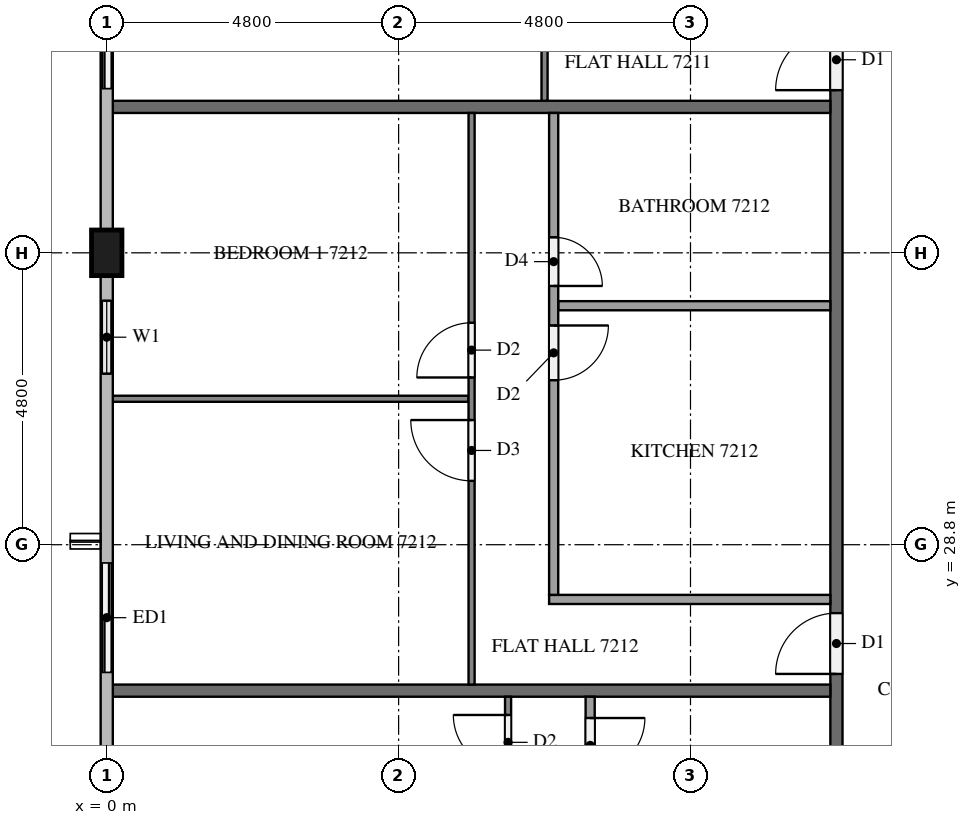
"""IFC4 building model, lengths in metres.
Left out: names, types, materials, properties, quantities, classifications, styles, units other than length and angle.
Written with IfcOpenShell. Run it as: python <this file> out.ifc"""

import sys

from ifc_helpers import new_model, si_unit, direction, frame, frame_2d, origin, origin_2d, place, context, subcontext, project, spatial, rectangle, extrude, element, fill, save


model = new_model("IFC4")
c1 = context("Model", 3, precision=1e-05, world=origin(), true_north=direction((0.0, 1.0)))
c2 = subcontext(c1, "Body", "Model", "MODEL_VIEW")
j1 = project(units=[si_unit("LENGTHUNIT", "METRE"), si_unit("PLANEANGLEUNIT", "RADIAN")], contexts=[c1])
p1 = place(None, origin())
s1 = spatial("IfcSite", under=j1, at=p1, CompositionType="ELEMENT")
p2 = place(p1, origin())
s2 = spatial("IfcBuilding", under=s1, at=p2, CompositionType="ELEMENT")
p3 = place(p2, frame((0.0, 0.0, 275.6)))
s3 = spatial("IfcBuildingStorey", under=s2, at=p3, CompositionType="ELEMENT", Elevation=275.6)
p4 = place(p3, frame((0.0, 33.6, 0.0), z_axis=(0.0, 0.0, 1.0), x_axis=(0.0, 1.0, 0.0)))
e1 = element("IfcColumn", 1, at=p4, inside=s3, PredefinedType="COLUMN", context=c2, shape_type="SweptSolid", body=[
    extrude(rectangle(XDim=0.75, YDim=0.5, at=origin_2d()), origin(), (0.0, 0.0, 1.0), 3.2),
])
p5 = place(p3, frame((0.0, 38.4, 0.0), z_axis=(0.0, 0.0, 1.0), x_axis=(0.0, -1.0, 0.0)))
e2 = element("IfcWall", 2, at=p5, inside=s3, PredefinedType="SOLIDWALL", context=c2, shape_type="SweptSolid", body=[
    extrude(rectangle(XDim=2.4, YDim=0.15, at=frame_2d((1.2, 0.0))), origin(), (0.0, 0.0, 1.0), 3.2),
])
p6 = place(p5, frame((0.3, 0.0, 0.0)))
e3 = element("IfcOpeningElement", 3, at=p6, cuts=e2, PredefinedType="OPENING", context=c2, shape_type="SweptSolid", body=[
    extrude(rectangle(XDim=1.8, YDim=2.4, at=frame_2d((0.9, 1.2))), frame((0.0, 0.085, 0.0), z_axis=(0.0, -1.0, 0.0), x_axis=(1.0, 0.0, 0.0)), (0.0, 0.0, 1.0), 0.17),
])
p7 = place(p3, frame((0.0, 33.225, 0.0), z_axis=(0.0, 0.0, 1.0), x_axis=(0.0, -1.0, 0.0)))
e4 = element("IfcWall", 4, at=p7, inside=s3, PredefinedType="SOLIDWALL", context=c2, shape_type="SweptSolid", body=[
    extrude(rectangle(XDim=2.025, YDim=0.15, at=frame_2d((1.013, 0.0))), origin(), (0.0, 0.0, 1.0), 3.2),
])
p8 = place(p7, frame((0.413, 0.0, 0.9)))
e5 = element("IfcOpeningElement", 5, at=p8, cuts=e4, PredefinedType="OPENING", context=c2, shape_type="SweptSolid", body=[
    extrude(rectangle(XDim=1.2, YDim=1.4, at=frame_2d((0.6, 0.7))), frame((0.0, 0.085, 0.0), z_axis=(0.0, -1.0, 0.0), x_axis=(1.0, 0.0, 0.0)), (0.0, 0.0, 1.0), 0.17),
])
p9 = place(p3, frame((0.0, 28.8, 0.0), z_axis=(0.0, 0.0, 1.0), x_axis=(0.0, -1.0, 0.0)))
e6 = element("IfcWall", 6, at=p9, inside=s3, PredefinedType="SOLIDWALL", context=c2, shape_type="SweptSolid", body=[
    extrude(rectangle(XDim=2.4, YDim=0.15, at=frame_2d((1.2, 0.0))), origin(), (0.0, 0.0, 1.0), 3.2),
])
p10 = place(p9, frame((0.3, 0.0, 0.0)))
e7 = element("IfcOpeningElement", 7, at=p10, cuts=e6, PredefinedType="OPENING", context=c2, shape_type="SweptSolid", body=[
    extrude(rectangle(XDim=1.8, YDim=2.4, at=frame_2d((0.9, 1.2))), frame((0.0, 0.085, 0.0), z_axis=(0.0, -1.0, 0.0), x_axis=(1.0, 0.0, 0.0)), (0.0, 0.0, 1.0), 0.17),
])
p11 = place(p3, frame((12.0, 12.1, 0.0), z_axis=(0.0, 0.0, 1.0), x_axis=(0.0, 1.0, 0.0)))
e8 = element("IfcWall", 8, at=p11, inside=s3, PredefinedType="PARTITIONING", context=c2, shape_type="SweptSolid", body=[
    extrude(rectangle(XDim=28.6, YDim=0.2, at=frame_2d((14.3, 0.0))), origin(), (0.0, 0.0, 1.0), 3.2),
])
p12 = place(p11, frame((24.175, 0.0, 0.0)))
e9 = element("IfcOpeningElement", 9, at=p12, cuts=e8, PredefinedType="OPENING", context=c2, shape_type="SweptSolid", body=[
    extrude(rectangle(XDim=1.0, YDim=2.1, at=frame_2d((0.5, 1.05))), frame((0.0, 0.11, 0.0), z_axis=(0.0, -1.0, 0.0), x_axis=(1.0, 0.0, 0.0)), (0.0, 0.0, 1.0), 0.22),
])
p13 = place(p11, frame((14.575, 0.0, 0.0)))
e10 = element("IfcOpeningElement", 10, at=p13, cuts=e8, PredefinedType="OPENING", context=c2, shape_type="SweptSolid", body=[
    extrude(rectangle(XDim=1.0, YDim=2.1, at=frame_2d((0.5, 1.05))), frame((0.0, 0.11, 0.0), z_axis=(0.0, -1.0, 0.0), x_axis=(1.0, 0.0, 0.0)), (0.0, 0.0, 1.0), 0.22),
])
p14 = place(p11, frame((0.175, 0.0, 0.0)))
e11 = element("IfcOpeningElement", 11, at=p14, cuts=e8, PredefinedType="OPENING", context=c2, shape_type="SweptSolid", body=[
    extrude(rectangle(XDim=1.0, YDim=2.1, at=frame_2d((0.5, 1.05))), frame((0.0, 0.11, 0.0), z_axis=(0.0, -1.0, 0.0), x_axis=(1.0, 0.0, 0.0)), (0.0, 0.0, 1.0), 0.22),
])
for number, where, z_axis, x_axis in (
    (12, (0.1, 36.0, 0.0), (0.0, 0.0, 1.0), (1.0, 0.0, 0.0)),
    (13, (0.1, 26.4, 0.0), (0.0, 0.0, 1.0), (1.0, 0.0, 0.0)),
):
    element("IfcWall", number, at=place(p3, frame(where, z_axis=z_axis, x_axis=x_axis)), inside=s3, PredefinedType="PARTITIONING", context=c2, shape_type="SweptSolid", body=[
        extrude(rectangle(XDim=11.8, YDim=0.2, at=frame_2d((5.9, 0.0))), origin(), (0.0, 0.0, 1.0), 3.2),
    ])
p15 = place(p3, frame((7.2, 36.1, 0.0), z_axis=(0.0, 0.0, 1.0), x_axis=(0.0, 1.0, 0.0)))
e14 = element("IfcWall", 14, at=p15, inside=s3, PredefinedType="PARTITIONING", context=c2, shape_type="SweptSolid", body=[
    extrude(rectangle(XDim=11.8, YDim=0.1, at=frame_2d((5.9, 0.0))), origin(), (0.0, 0.0, 1.0), 3.2),
])
p16 = place(p15, frame((5.75, 0.0, 0.0)))
e15 = element("IfcOpeningElement", 15, at=p16, cuts=e14, PredefinedType="OPENING", context=c2, shape_type="SweptSolid", body=[
    extrude(rectangle(XDim=1.0, YDim=2.1, at=frame_2d((0.5, 1.05))), frame((0.0, 0.06, 0.0), z_axis=(0.0, -1.0, 0.0), x_axis=(1.0, 0.0, 0.0)), (0.0, 0.0, 1.0), 0.12),
])
p17 = place(p15, frame((7.45, 0.0, 0.0)))
e16 = element("IfcOpeningElement", 16, at=p17, cuts=e14, PredefinedType="OPENING", context=c2, shape_type="SweptSolid", body=[
    extrude(rectangle(XDim=0.9, YDim=2.1, at=frame_2d((0.45, 1.05))), frame((0.0, 0.06, 0.0), z_axis=(0.0, -1.0, 0.0), x_axis=(1.0, 0.0, 0.0)), (0.0, 0.0, 1.0), 0.12),
])
p18 = place(p3, frame((5.95, 31.2, 0.0), z_axis=(0.0, 0.0, 1.0), x_axis=(-1.0, 0.0, 0.0)))
e17 = element("IfcWall", 17, at=p18, inside=s3, PredefinedType="PARTITIONING", context=c2, shape_type="SweptSolid", body=[
    extrude(rectangle(XDim=5.85, YDim=0.1, at=frame_2d((2.925, 0.0))), origin(), (0.0, 0.0, 1.0), 3.2),
])
p19 = place(p3, frame((6.0, 26.5, 0.0), z_axis=(0.0, 0.0, 1.0), x_axis=(0.0, 1.0, 0.0)))
e18 = element("IfcWall", 18, at=p19, inside=s3, PredefinedType="PARTITIONING", context=c2, shape_type="SweptSolid", body=[
    extrude(rectangle(XDim=9.4, YDim=0.1, at=frame_2d((4.7, 0.0))), origin(), (0.0, 0.0, 1.0), 3.2),
])
p20 = place(p19, frame((3.35, 0.0, 0.0)))
e19 = element("IfcOpeningElement", 19, at=p20, cuts=e18, PredefinedType="OPENING", context=c2, shape_type="SweptSolid", body=[
    extrude(rectangle(XDim=1.0, YDim=2.1, at=frame_2d((0.5, 1.05))), frame((0.0, 0.06, 0.0), z_axis=(0.0, -1.0, 0.0), x_axis=(1.0, 0.0, 0.0)), (0.0, 0.0, 1.0), 0.12),
])
p21 = place(p19, frame((5.05, 0.0, 0.0)))
e20 = element("IfcOpeningElement", 20, at=p21, cuts=e18, PredefinedType="OPENING", context=c2, shape_type="SweptSolid", body=[
    extrude(rectangle(XDim=0.9, YDim=2.1, at=frame_2d((0.45, 1.05))), frame((0.0, 0.06, 0.0), z_axis=(0.0, -1.0, 0.0), x_axis=(1.0, 0.0, 0.0)), (0.0, 0.0, 1.0), 0.12),
])
p22 = place(p3, frame((11.9, 32.73, 0.0), z_axis=(0.0, 0.0, 1.0), x_axis=(-1.0, 0.0, 0.0)))
e21 = element("IfcWall", 21, at=p22, inside=s3, PredefinedType="PARTITIONING", context=c2, shape_type="SweptSolid", body=[
    extrude(rectangle(XDim=4.475, YDim=0.15, at=frame_2d((2.237, 0.0))), origin(), (0.0, 0.0, 1.0), 3.2),
])
p23 = place(p3, frame((11.9, 27.9, 0.0), z_axis=(0.0, 0.0, 1.0), x_axis=(-1.0, 0.0, 0.0)))
e22 = element("IfcWall", 22, at=p23, inside=s3, PredefinedType="PARTITIONING", context=c2, shape_type="SweptSolid", body=[
    extrude(rectangle(XDim=4.625, YDim=0.15, at=frame_2d((2.312, 0.0))), origin(), (0.0, 0.0, 1.0), 3.2),
])
p24 = place(p3, frame((7.35, 35.9, 0.0), z_axis=(0.0, 0.0, 1.0), x_axis=(0.0, -1.0, 0.0)))
e23 = element("IfcWall", 23, at=p24, inside=s3, PredefinedType="PARTITIONING", context=c2, shape_type="SweptSolid", body=[
    extrude(rectangle(XDim=7.925, YDim=0.15, at=frame_2d((3.962, 0.0))), origin(), (0.0, 0.0, 1.0), 3.2),
])
p25 = place(p24, frame((3.495, 0.0, 0.0)))
e24 = element("IfcOpeningElement", 24, at=p25, cuts=e23, PredefinedType="OPENING", context=c2, shape_type="SweptSolid", body=[
    extrude(rectangle(XDim=0.9, YDim=2.1, at=frame_2d((0.45, 1.05))), frame((0.0, 0.085, 0.0), z_axis=(0.0, -1.0, 0.0), x_axis=(1.0, 0.0, 0.0)), (0.0, 0.0, 1.0), 0.17),
])
p26 = place(p24, frame((2.045, 0.0, 0.0)))
e25 = element("IfcOpeningElement", 25, at=p26, cuts=e23, PredefinedType="OPENING", context=c2, shape_type="SweptSolid", body=[
    extrude(rectangle(XDim=0.8, YDim=2.1, at=frame_2d((0.4, 1.05))), frame((0.0, 0.085, 0.0), z_axis=(0.0, -1.0, 0.0), x_axis=(1.0, 0.0, 0.0)), (0.0, 0.0, 1.0), 0.17),
])
p27 = place(p3, frame((6.6, 12.1, 0.0), z_axis=(0.0, 0.0, 1.0), x_axis=(0.0, 1.0, 0.0)))
e26 = element("IfcWall", 26, at=p27, inside=s3, PredefinedType="PARTITIONING", context=c2, shape_type="SweptSolid", body=[
    extrude(rectangle(XDim=14.2, YDim=0.1, at=frame_2d((7.1, 0.0))), origin(), (0.0, 0.0, 1.0), 3.2),
])
p28 = place(p27, frame((3.35, 0.0, 0.0)))
e27 = element("IfcOpeningElement", 27, at=p28, cuts=e26, PredefinedType="OPENING", context=c2, shape_type="SweptSolid", body=[
    extrude(rectangle(XDim=1.0, YDim=2.1, at=frame_2d((0.5, 1.05))), frame((0.0, 0.06, 0.0), z_axis=(0.0, -1.0, 0.0), x_axis=(1.0, 0.0, 0.0)), (0.0, 0.0, 1.0), 0.12),
])
p29 = place(p27, frame((5.05, 0.0, 0.0)))
e28 = element("IfcOpeningElement", 28, at=p29, cuts=e26, PredefinedType="OPENING", context=c2, shape_type="SweptSolid", body=[
    extrude(rectangle(XDim=0.9, YDim=2.1, at=frame_2d((0.45, 1.05))), frame((0.0, 0.06, 0.0), z_axis=(0.0, -1.0, 0.0), x_axis=(1.0, 0.0, 0.0)), (0.0, 0.0, 1.0), 0.12),
])
p30 = place(p27, frame((13.0, 0.0, 0.0)))
e29 = element("IfcOpeningElement", 29, at=p30, cuts=e26, PredefinedType="OPENING", context=c2, shape_type="SweptSolid", body=[
    extrude(rectangle(XDim=0.9, YDim=2.1, at=frame_2d((0.45, 1.05))), frame((0.0, 0.06, 0.0), z_axis=(0.0, -1.0, 0.0), x_axis=(1.0, 0.0, 0.0)), (0.0, 0.0, 1.0), 0.12),
])
p31 = place(p3, frame((7.95, 26.3, 0.0), z_axis=(0.0, 0.0, 1.0), x_axis=(0.0, -1.0, 0.0)))
e30 = element("IfcWall", 30, at=p31, inside=s3, PredefinedType="PARTITIONING", context=c2, shape_type="SweptSolid", body=[
    extrude(rectangle(XDim=12.725, YDim=0.15, at=frame_2d((6.363, 0.0))), origin(), (0.0, 0.0, 1.0), 3.2),
])
p32 = place(p31, frame((9.135, 0.0, 0.0)))
e31 = element("IfcOpeningElement", 31, at=p32, cuts=e30, PredefinedType="OPENING", context=c2, shape_type="SweptSolid", body=[
    extrude(rectangle(XDim=0.9, YDim=2.1, at=frame_2d((0.45, 1.05))), frame((0.0, 0.085, 0.0), z_axis=(0.0, -1.0, 0.0), x_axis=(1.0, 0.0, 0.0)), (0.0, 0.0, 1.0), 0.17),
])
p33 = place(p31, frame((7.685, 0.0, 0.0)))
e32 = element("IfcOpeningElement", 32, at=p33, cuts=e30, PredefinedType="OPENING", context=c2, shape_type="SweptSolid", body=[
    extrude(rectangle(XDim=0.8, YDim=2.1, at=frame_2d((0.4, 1.05))), frame((0.0, 0.085, 0.0), z_axis=(0.0, -1.0, 0.0), x_axis=(1.0, 0.0, 0.0)), (0.0, 0.0, 1.0), 0.17),
])
p34 = place(p31, frame((0.35, 0.0, 0.0)))
e33 = element("IfcOpeningElement", 33, at=p34, cuts=e30, PredefinedType="OPENING", context=c2, shape_type="SweptSolid", body=[
    extrude(rectangle(XDim=0.9, YDim=2.1, at=frame_2d((0.45, 1.05))), frame((0.0, 0.085, 0.0), z_axis=(0.0, -1.0, 0.0), x_axis=(1.0, 0.0, 0.0)), (0.0, 0.0, 1.0), 0.17),
])
p35 = place(p6, origin())
e34 = element("IfcDoor", 34, at=p35, inside=s3, OperationType="SLIDING_TO_LEFT", PredefinedType="DOOR", context=c2, shape_type="SweptSolid", body=[
    extrude(rectangle(XDim=1.8, YDim=2.4, at=frame_2d((0.9, 1.2))), frame((0.0, 0.025, 0.0), z_axis=(0.0, -1.0, 0.0), x_axis=(1.0, 0.0, 0.0)), (0.0, 0.0, 1.0), 0.05),
])
fill(e3, e34)
p36 = place(p8, origin())
e35 = element("IfcWindow", 35, at=p36, inside=s3, PartitioningType="SINGLE_PANEL", PredefinedType="WINDOW", context=c2, shape_type="SweptSolid", body=[
    extrude(rectangle(XDim=1.2, YDim=1.4, at=frame_2d((0.6, 0.7))), frame((0.0, 0.03, 0.0), z_axis=(0.0, -1.0, 0.0), x_axis=(1.0, 0.0, 0.0)), (0.0, 0.0, 1.0), 0.06),
])
fill(e5, e35)
p37 = place(p10, origin())
e36 = element("IfcDoor", 36, at=p37, inside=s3, OperationType="SLIDING_TO_RIGHT", PredefinedType="DOOR", context=c2, shape_type="SweptSolid", body=[
    extrude(rectangle(XDim=1.8, YDim=2.4, at=frame_2d((0.9, 1.2))), frame((0.0, 0.025, 0.0), z_axis=(0.0, -1.0, 0.0), x_axis=(1.0, 0.0, 0.0)), (0.0, 0.0, 1.0), 0.05),
])
fill(e7, e36)
p38 = place(p12, origin())
e37 = element("IfcDoor", 37, at=p38, inside=s3, OperationType="SINGLE_SWING_LEFT", PredefinedType="DOOR", context=c2, shape_type="SweptSolid", body=[
    extrude(rectangle(XDim=1.0, YDim=2.1, at=frame_2d((0.5, 1.05))), frame((0.0, 0.025, 0.0), z_axis=(0.0, -1.0, 0.0), x_axis=(1.0, 0.0, 0.0)), (0.0, 0.0, 1.0), 0.05),
])
fill(e9, e37)
p39 = place(p13, origin())
e38 = element("IfcDoor", 38, at=p39, inside=s3, OperationType="SINGLE_SWING_LEFT", PredefinedType="DOOR", context=c2, shape_type="SweptSolid", body=[
    extrude(rectangle(XDim=1.0, YDim=2.1, at=frame_2d((0.5, 1.05))), frame((0.0, 0.025, 0.0), z_axis=(0.0, -1.0, 0.0), x_axis=(1.0, 0.0, 0.0)), (0.0, 0.0, 1.0), 0.05),
])
fill(e10, e38)
p40 = place(p20, origin())
e39 = element("IfcDoor", 39, at=p40, inside=s3, OperationType="SINGLE_SWING_RIGHT", PredefinedType="DOOR", context=c2, shape_type="SweptSolid", body=[
    extrude(rectangle(XDim=1.0, YDim=2.1, at=frame_2d((0.5, 1.05))), frame((0.0, 0.025, 0.0), z_axis=(0.0, -1.0, 0.0), x_axis=(1.0, 0.0, 0.0)), (0.0, 0.0, 1.0), 0.05),
])
fill(e19, e39)
p41 = place(p21, origin())
e40 = element("IfcDoor", 40, at=p41, inside=s3, OperationType="SINGLE_SWING_LEFT", PredefinedType="DOOR", context=c2, shape_type="SweptSolid", body=[
    extrude(rectangle(XDim=0.9, YDim=2.1, at=frame_2d((0.45, 1.05))), frame((0.0, 0.025, 0.0), z_axis=(0.0, -1.0, 0.0), x_axis=(1.0, 0.0, 0.0)), (0.0, 0.0, 1.0), 0.05),
])
fill(e20, e40)
p42 = place(p25, origin())
e41 = element("IfcDoor", 41, at=p42, inside=s3, OperationType="SINGLE_SWING_LEFT", PredefinedType="DOOR", context=c2, shape_type="SweptSolid", body=[
    extrude(rectangle(XDim=0.9, YDim=2.1, at=frame_2d((0.45, 1.05))), frame((0.0, 0.025, 0.0), z_axis=(0.0, -1.0, 0.0), x_axis=(1.0, 0.0, 0.0)), (0.0, 0.0, 1.0), 0.05),
])
fill(e24, e41)
p43 = place(p26, origin())
e42 = element("IfcDoor", 42, at=p43, inside=s3, OperationType="SINGLE_SWING_RIGHT", PredefinedType="DOOR", context=c2, shape_type="SweptSolid", body=[
    extrude(rectangle(XDim=0.8, YDim=2.1, at=frame_2d((0.4, 1.05))), frame((0.0, 0.025, 0.0), z_axis=(0.0, -1.0, 0.0), x_axis=(1.0, 0.0, 0.0)), (0.0, 0.0, 1.0), 0.05),
])
fill(e25, e42)
p44 = place(p30, origin())
e43 = element("IfcDoor", 43, at=p44, inside=s3, OperationType="SINGLE_SWING_RIGHT", PredefinedType="DOOR", context=c2, shape_type="SweptSolid", body=[
    extrude(rectangle(XDim=0.9, YDim=2.1, at=frame_2d((0.45, 1.05))), frame((0.0, 0.025, 0.0), z_axis=(0.0, -1.0, 0.0), x_axis=(1.0, 0.0, 0.0)), (0.0, 0.0, 1.0), 0.05),
])
fill(e29, e43)
p45 = place(p34, origin())
e44 = element("IfcDoor", 44, at=p45, inside=s3, OperationType="SINGLE_SWING_LEFT", PredefinedType="DOOR", context=c2, shape_type="SweptSolid", body=[
    extrude(rectangle(XDim=0.9, YDim=2.1, at=frame_2d((0.45, 1.05))), frame((0.0, 0.025, 0.0), z_axis=(0.0, -1.0, 0.0), x_axis=(1.0, 0.0, 0.0)), (0.0, 0.0, 1.0), 0.05),
])
fill(e33, e44)
save(model, sys.argv[1])
